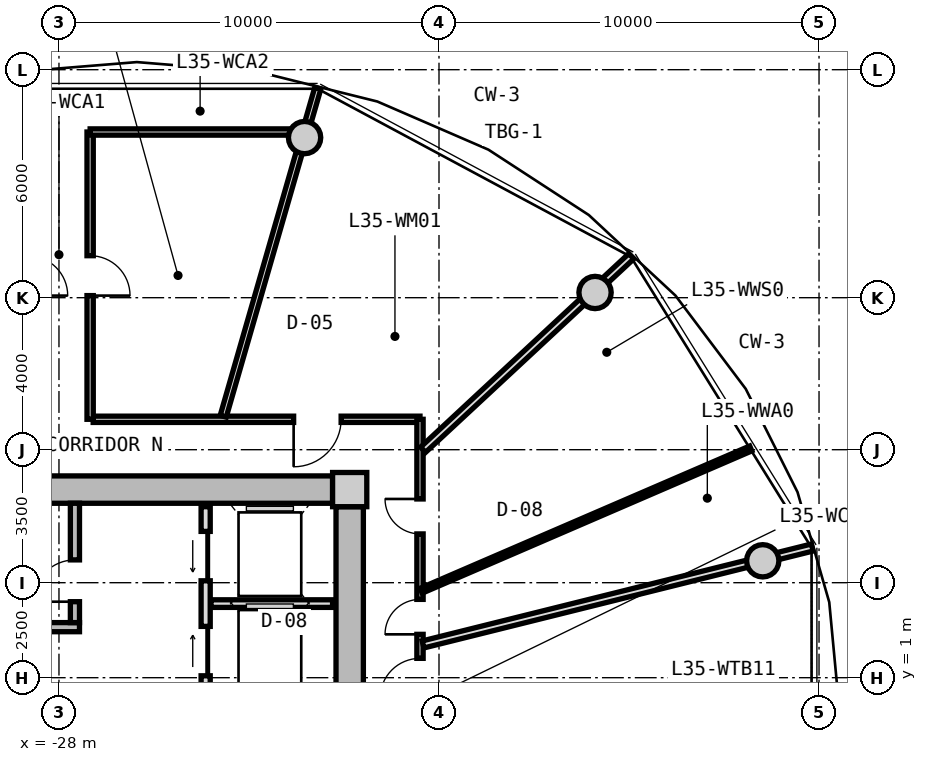
"""IFC4 building model, lengths in metres.
Left out: names, types, materials, properties, quantities, classifications, styles, units other than length and angle.
Written with IfcOpenShell. Run it as: python <this file> out.ifc"""

import sys

from ifc_helpers import new_model, si_unit, direction, frame, frame_2d, origin, origin_2d, place, context, subcontext, project, spatial, rectangle, circle, extrude, source, transform, mapped, element, fill, save


model = new_model("IFC4")
c1 = context("Model", 3, precision=1e-05, world=origin(), true_north=direction((0.0, 1.0)))
c2 = subcontext(c1, "Body", "Model", "MODEL_VIEW")
j1 = project(units=[si_unit("LENGTHUNIT", "METRE"), si_unit("PLANEANGLEUNIT", "RADIAN")], contexts=[c1])
p1 = place(None, origin())
s1 = spatial("IfcSite", under=j1, at=p1, CompositionType="ELEMENT")
p2 = place(p1, origin())
s2 = spatial("IfcBuilding", under=s1, at=p2, CompositionType="ELEMENT")
p3 = place(p2, frame((0.0, 0.0, 114.55)))
s3 = spatial("IfcBuildingStorey", under=s2, at=p3, CompositionType="ELEMENT", Elevation=114.55)
m1 = source(origin(), c2, "Body", "SweptSolid", [
    extrude(rectangle(XDim=0.9, YDim=0.9, at=origin_2d()), origin(), (0.0, 0.0, 1.0), 3.05),
])
p4 = place(p3, frame((-20.35, 5.95, 0.0), z_axis=(0.0, 0.0, 1.0), x_axis=(1.0, 0.0, 0.0)))
e1 = element("IfcColumn", 1, at=p4, inside=s3, PredefinedType="COLUMN", context=c2, shape_type="MappedRepresentation", body=[
    mapped(m1, transform((0.0, 0.0, 0.0), x_axis=(1.0, 0.0, 0.0), y_axis=(0.0, 1.0, 0.0), z_axis=(0.0, 0.0, 1.0), scale=1.0)),
])
m2 = source(origin(), c2, "Body", "SweptSolid", [
    extrude(rectangle(XDim=14.4, YDim=0.72, at=frame_2d((7.2, 0.0))), origin(), (0.0, 0.0, 1.0), 2.79),
])
p5 = place(p3, frame((-35.2, 5.95, 0.0), z_axis=(0.0, 0.0, 1.0), x_axis=(1.0, 0.0, 0.0)))
e2 = element("IfcWall", 2, at=p5, inside=s3, PredefinedType="SHEAR", context=c2, shape_type="MappedRepresentation", body=[
    mapped(m2, transform((0.0, 0.0, 0.0), x_axis=(1.0, 0.0, 0.0), y_axis=(0.0, 1.0, 0.0), z_axis=(0.0, 0.0, 1.0), scale=1.0)),
])
m3 = source(origin(), c2, "Body", "SweptSolid", [
    extrude(rectangle(XDim=11.0, YDim=0.72, at=frame_2d((5.5, 0.0))), origin(), (0.0, 0.0, 1.0), 2.79),
])
p6 = place(p3, frame((-20.35, 5.5, 0.0), z_axis=(0.0, 0.0, 1.0), x_axis=(0.0, -1.0, 0.0)))
e3 = element("IfcWall", 3, at=p6, inside=s3, PredefinedType="SHEAR", context=c2, shape_type="MappedRepresentation", body=[
    mapped(m3, transform((0.0, 0.0, 0.0), x_axis=(1.0, 0.0, 0.0), y_axis=(0.0, 1.0, 0.0), z_axis=(0.0, 0.0, 1.0), scale=1.0)),
])
p7 = place(p6, frame((5.65, 0.0, 0.0)))
e4 = element("IfcOpeningElement", 4, at=p7, cuts=e3, PredefinedType="OPENING", context=c2, shape_type="SweptSolid", body=[
    extrude(rectangle(XDim=1.2, YDim=2.15, at=frame_2d((0.6, 1.075))), frame((0.0, 0.37, 0.0), z_axis=(0.0, -1.0, 0.0), x_axis=(1.0, 0.0, 0.0)), (0.0, 0.0, 1.0), 0.74),
])
p8 = place(p6, frame((9.3, 0.0, 0.0)))
e5 = element("IfcOpeningElement", 5, at=p8, cuts=e3, PredefinedType="OPENING", context=c2, shape_type="SweptSolid", body=[
    extrude(rectangle(XDim=1.0, YDim=2.1, at=frame_2d((0.5, 1.05))), frame((0.0, 0.37, 0.0), z_axis=(0.0, -1.0, 0.0), x_axis=(1.0, 0.0, 0.0)), (0.0, 0.0, 1.0), 0.74),
])
m4 = source(origin(), c2, "Body", "SweptSolid", [
    extrude(circle(Radius=0.425, at=origin_2d()), origin(), (0.0, 0.0, 1.0), 3.05),
])
for number, where, z_axis, x_axis in (
    (6, (-9.481, 4.076, 0.0), (0.0, 0.0, 1.0), (1.0, 0.0, 0.0)),
    (7, (-13.894, 11.137, 0.0), (0.0, 0.0, 1.0), (1.0, 0.0, 0.0)),
    (8, (-21.537, 15.213, 0.0), (0.0, 0.0, 1.0), (1.0, 0.0, 0.0)),
):
    element("IfcColumn", number, at=place(p3, frame(where, z_axis=z_axis, x_axis=x_axis)), inside=s3, PredefinedType="COLUMN", context=c2, shape_type="MappedRepresentation", body=[
        mapped(m4, transform((0.0, 0.0, 0.0), x_axis=(1.0, 0.0, 0.0), y_axis=(0.0, 1.0, 0.0), z_axis=(0.0, 0.0, 1.0), scale=1.0)),
    ])
m5 = source(origin(), c2, "Body", "SweptSolid", [
    extrude(rectangle(XDim=7.83, YDim=0.24, at=frame_2d((3.915, 0.0))), origin(), (0.0, 0.0, 1.0), 2.79),
])
p9 = place(p3, frame((-35.29, 2.33, 0.0), z_axis=(0.0, 0.0, 1.0), x_axis=(1.0, 0.0, 0.0)))
e9 = element("IfcWall", 9, at=p9, inside=s3, PredefinedType="PARTITIONING", context=c2, shape_type="MappedRepresentation", body=[
    mapped(m5, transform((0.0, 0.0, 0.0), x_axis=(1.0, 0.0, 0.0), y_axis=(0.0, 1.0, 0.0), z_axis=(0.0, 0.0, 1.0), scale=1.0)),
])
m6 = source(origin(), c2, "Body", "SweptSolid", [
    extrude(rectangle(XDim=3.14, YDim=0.24, at=frame_2d((1.57, 0.0))), origin(), (0.0, 0.0, 1.0), 2.79),
])
p10 = place(p3, frame((-27.58, 2.45, 0.0), z_axis=(0.0, 0.0, 1.0), x_axis=(0.0, 1.0, 0.0)))
e10 = element("IfcWall", 10, at=p10, inside=s3, PredefinedType="PARTITIONING", context=c2, shape_type="MappedRepresentation", body=[
    mapped(m6, transform((0.0, 0.0, 0.0), x_axis=(1.0, 0.0, 0.0), y_axis=(0.0, 1.0, 0.0), z_axis=(0.0, 0.0, 1.0), scale=1.0)),
])
p11 = place(p10, frame((0.55, 0.0, 0.0)))
e11 = element("IfcOpeningElement", 11, at=p11, cuts=e10, PredefinedType="OPENING", context=c2, shape_type="SweptSolid", body=[
    extrude(rectangle(XDim=1.1, YDim=2.15, at=frame_2d((0.55, 1.075))), frame((0.0, 0.13, 0.0), z_axis=(0.0, -1.0, 0.0), x_axis=(1.0, 0.0, 0.0)), (0.0, 0.0, 1.0), 0.26),
])
m7 = source(origin(), c2, "Body", "SweptSolid", [
    extrude(rectangle(XDim=5.0, YDim=0.24, at=frame_2d((2.5, 0.0))), origin(), (0.0, 0.0, 1.0), 2.775),
])
p12 = place(p3, frame((-24.14, 0.5, 0.0), z_axis=(0.0, 0.0, 1.0), x_axis=(0.0, 1.0, 0.0)))
e12 = element("IfcWall", 12, at=p12, inside=s3, PredefinedType="PARTITIONING", context=c2, shape_type="MappedRepresentation", body=[
    mapped(m7, transform((0.0, 0.0, 0.0), x_axis=(1.0, 0.0, 0.0), y_axis=(0.0, 1.0, 0.0), z_axis=(0.0, 0.0, 1.0), scale=1.0)),
])
p13 = place(p12, frame((3.05, 0.0, 0.0)))
e13 = element("IfcOpeningElement", 13, at=p13, cuts=e12, PredefinedType="OPENING", context=c2, shape_type="SweptSolid", body=[
    extrude(rectangle(XDim=1.3, YDim=2.2, at=frame_2d((0.65, 1.1))), frame((0.0, 0.13, 0.0), z_axis=(0.0, -1.0, 0.0), x_axis=(1.0, 0.0, 0.0)), (0.0, 0.0, 1.0), 0.26),
])
p14 = place(p12, frame((0.55, 0.0, 0.0)))
e14 = element("IfcOpeningElement", 14, at=p14, cuts=e12, PredefinedType="OPENING", context=c2, shape_type="SweptSolid", body=[
    extrude(rectangle(XDim=1.3, YDim=2.2, at=frame_2d((0.65, 1.1))), frame((0.0, 0.13, 0.0), z_axis=(0.0, -1.0, 0.0), x_axis=(1.0, 0.0, 0.0)), (0.0, 0.0, 1.0), 0.26),
])
m8 = source(origin(), c2, "Body", "SweptSolid", [
    extrude(rectangle(XDim=3.2, YDim=0.2, at=frame_2d((1.6, 0.0))), origin(), (0.0, 0.0, 1.0), 2.775),
])
p15 = place(p3, frame((-24.0, 2.95, 0.0), z_axis=(0.0, 0.0, 1.0), x_axis=(1.0, 0.0, 0.0)))
e15 = element("IfcWall", 15, at=p15, inside=s3, PredefinedType="PARTITIONING", context=c2, shape_type="MappedRepresentation", body=[
    mapped(m8, transform((0.0, 0.0, 0.0), x_axis=(1.0, 0.0, 0.0), y_axis=(0.0, 1.0, 0.0), z_axis=(0.0, 0.0, 1.0), scale=1.0)),
])
m9 = source(origin(), c2, "Body", "SweptSolid", [
    extrude(rectangle(XDim=8.6, YDim=0.165, at=frame_2d((4.3, 0.0))), origin(), (0.0, 0.0, 1.0), 2.775),
])
p16 = place(p3, frame((-27.1, 7.8, 0.0), z_axis=(0.0, 0.0, 1.0), x_axis=(1.0, 0.0, 0.0)))
e16 = element("IfcWall", 16, at=p16, inside=s3, PredefinedType="PARTITIONING", context=c2, shape_type="MappedRepresentation", body=[
    mapped(m9, transform((0.0, 0.0, 0.0), x_axis=(1.0, 0.0, 0.0), y_axis=(0.0, 1.0, 0.0), z_axis=(0.0, 0.0, 1.0), scale=1.0)),
])
p17 = place(p16, frame((5.275, 0.0, 0.0)))
e17 = element("IfcOpeningElement", 17, at=p17, cuts=e16, PredefinedType="OPENING", context=c2, shape_type="SweptSolid", body=[
    extrude(rectangle(XDim=1.25, YDim=2.2, at=frame_2d((0.625, 1.1))), frame((0.0, 0.093, 0.0), z_axis=(0.0, -1.0, 0.0), x_axis=(1.0, 0.0, 0.0)), (0.0, 0.0, 1.0), 0.185),
])
m10 = source(origin(), c2, "Body", "SweptSolid", [
    extrude(rectangle(XDim=15.6, YDim=0.165, at=frame_2d((7.8, 0.0))), origin(), (0.0, 0.0, 1.0), 2.775),
])
p18 = place(p3, frame((-18.5, 7.8, 0.0), z_axis=(0.0, 0.0, 1.0), x_axis=(0.0, -1.0, 0.0)))
e18 = element("IfcWall", 18, at=p18, inside=s3, PredefinedType="PARTITIONING", context=c2, shape_type="MappedRepresentation", body=[
    mapped(m10, transform((0.0, 0.0, 0.0), x_axis=(1.0, 0.0, 0.0), y_axis=(0.0, 1.0, 0.0), z_axis=(0.0, 0.0, 1.0), scale=1.0)),
])
p19 = place(p18, frame((12.002, 0.0, 0.0)))
e19 = element("IfcOpeningElement", 19, at=p19, cuts=e18, PredefinedType="OPENING", context=c2, shape_type="SweptSolid", body=[
    extrude(rectangle(XDim=1.05, YDim=2.15, at=frame_2d((0.525, 1.075))), frame((0.0, 0.093, 0.0), z_axis=(0.0, -1.0, 0.0), x_axis=(1.0, 0.0, 0.0)), (0.0, 0.0, 1.0), 0.185),
])
p20 = place(p18, frame((10.211, 0.0, 0.0)))
e20 = element("IfcOpeningElement", 20, at=p20, cuts=e18, PredefinedType="OPENING", context=c2, shape_type="SweptSolid", body=[
    extrude(rectangle(XDim=1.05, YDim=2.15, at=frame_2d((0.525, 1.075))), frame((0.0, 0.093, 0.0), z_axis=(0.0, -1.0, 0.0), x_axis=(1.0, 0.0, 0.0)), (0.0, 0.0, 1.0), 0.185),
])
p21 = place(p18, frame((8.212, 0.0, 0.0)))
e21 = element("IfcOpeningElement", 21, at=p21, cuts=e18, PredefinedType="OPENING", context=c2, shape_type="SweptSolid", body=[
    extrude(rectangle(XDim=1.05, YDim=2.15, at=frame_2d((0.525, 1.075))), frame((0.0, 0.093, 0.0), z_axis=(0.0, -1.0, 0.0), x_axis=(1.0, 0.0, 0.0)), (0.0, 0.0, 1.0), 0.185),
])
p22 = place(p18, frame((6.291, 0.0, 0.0)))
e22 = element("IfcOpeningElement", 22, at=p22, cuts=e18, PredefinedType="OPENING", context=c2, shape_type="SweptSolid", body=[
    extrude(rectangle(XDim=1.05, YDim=2.15, at=frame_2d((0.525, 1.075))), frame((0.0, 0.093, 0.0), z_axis=(0.0, -1.0, 0.0), x_axis=(1.0, 0.0, 0.0)), (0.0, 0.0, 1.0), 0.185),
])
p23 = place(p18, frame((4.739, 0.0, 0.0)))
e23 = element("IfcOpeningElement", 23, at=p23, cuts=e18, PredefinedType="OPENING", context=c2, shape_type="SweptSolid", body=[
    extrude(rectangle(XDim=0.92, YDim=2.1, at=frame_2d((0.46, 1.05))), frame((0.0, 0.093, 0.0), z_axis=(0.0, -1.0, 0.0), x_axis=(1.0, 0.0, 0.0)), (0.0, 0.0, 1.0), 0.185),
])
p24 = place(p18, frame((2.096, 0.0, 0.0)))
e24 = element("IfcOpeningElement", 24, at=p24, cuts=e18, PredefinedType="OPENING", context=c2, shape_type="SweptSolid", body=[
    extrude(rectangle(XDim=0.92, YDim=2.1, at=frame_2d((0.46, 1.05))), frame((0.0, 0.093, 0.0), z_axis=(0.0, -1.0, 0.0), x_axis=(1.0, 0.0, 0.0)), (0.0, 0.0, 1.0), 0.185),
])
m11 = source(origin(), c2, "Body", "SweptSolid", [
    extrude(rectangle(XDim=8.989, YDim=0.165, at=frame_2d((4.495, 0.0))), origin(), (0.0, 0.0, 1.0), 2.275),
])
p25 = place(p3, frame((-23.678, 7.88, 0.0), z_axis=(0.0, 0.0, 1.0), x_axis=(0.27702323008, 0.960863221274, 0.0)))
e25 = element("IfcWall", 25, at=p25, inside=s3, PredefinedType="PARTITIONING", context=c2, shape_type="MappedRepresentation", body=[
    mapped(m11, transform((0.0, 0.0, 0.0), x_axis=(1.0, 0.0, 0.0), y_axis=(0.0, 1.0, 0.0), z_axis=(0.0, 0.0, 1.0), scale=1.0)),
])
m12 = source(origin(), c2, "Body", "SweptSolid", [
    extrude(rectangle(XDim=7.56, YDim=0.165, at=frame_2d((3.78, 0.0))), origin(), (0.0, 0.0, 1.0), 2.775),
])
p26 = place(p3, frame((-27.18, 7.8, 0.0), z_axis=(0.0, 0.0, 1.0), x_axis=(0.0, 1.0, 0.0)))
e26 = element("IfcWall", 26, at=p26, inside=s3, PredefinedType="PARTITIONING", context=c2, shape_type="MappedRepresentation", body=[
    mapped(m12, transform((0.0, 0.0, 0.0), x_axis=(1.0, 0.0, 0.0), y_axis=(0.0, 1.0, 0.0), z_axis=(0.0, 0.0, 1.0), scale=1.0)),
])
p27 = place(p26, frame((3.255, 0.0, 0.0)))
e27 = element("IfcOpeningElement", 27, at=p27, cuts=e26, PredefinedType="OPENING", context=c2, shape_type="SweptSolid", body=[
    extrude(rectangle(XDim=1.05, YDim=2.15, at=frame_2d((0.525, 1.075))), frame((0.0, 0.093, 0.0), z_axis=(0.0, -1.0, 0.0), x_axis=(1.0, 0.0, 0.0)), (0.0, 0.0, 1.0), 0.185),
])
m13 = source(origin(), c2, "Body", "SweptSolid", [
    extrude(rectangle(XDim=5.814, YDim=0.165, at=frame_2d((2.907, 0.0))), origin(), (0.0, 0.0, 1.0), 2.275),
])
p28 = place(p3, frame((-27.18, 15.36, 0.0), z_axis=(0.0, 0.0, 1.0), x_axis=(1.0, 0.0, 0.0)))
e28 = element("IfcWall", 28, at=p28, inside=s3, PredefinedType="PARTITIONING", context=c2, shape_type="MappedRepresentation", body=[
    mapped(m13, transform((0.0, 0.0, 0.0), x_axis=(1.0, 0.0, 0.0), y_axis=(0.0, 1.0, 0.0), z_axis=(0.0, 0.0, 1.0), scale=1.0)),
])
m14 = source(origin(), c2, "Body", "SweptSolid", [
    extrude(rectangle(XDim=10.556, YDim=0.19, at=frame_2d((5.278, 0.0))), origin(), (0.0, 0.0, 1.0), 2.275),
])
p29 = place(p3, frame((-18.42, 1.875, 0.0), z_axis=(0.0, 0.0, 1.0), x_axis=(0.970363857851, 0.241648470667, 0.0)))
e29 = element("IfcWall", 29, at=p29, inside=s3, PredefinedType="PARTITIONING", context=c2, shape_type="MappedRepresentation", body=[
    mapped(m14, transform((0.0, 0.0, 0.0), x_axis=(1.0, 0.0, 0.0), y_axis=(0.0, 1.0, 0.0), z_axis=(0.0, 0.0, 1.0), scale=1.0)),
])
m15 = source(origin(), c2, "Body", "SweptSolid", [
    extrude(rectangle(XDim=7.482, YDim=0.19, at=frame_2d((3.741, 0.0))), origin(), (0.0, 0.0, 1.0), 2.275),
])
p30 = place(p3, frame((-18.42, 6.998, 0.0), z_axis=(0.0, 0.0, 1.0), x_axis=(0.732508698043, 0.680757671489, 0.0)))
e30 = element("IfcWall", 30, at=p30, inside=s3, PredefinedType="PARTITIONING", context=c2, shape_type="MappedRepresentation", body=[
    mapped(m15, transform((0.0, 0.0, 0.0), x_axis=(1.0, 0.0, 0.0), y_axis=(0.0, 1.0, 0.0), z_axis=(0.0, 0.0, 1.0), scale=1.0)),
])
m16 = source(origin(), c2, "Body", "SweptSolid", [
    extrude(rectangle(XDim=9.447, YDim=0.14, at=frame_2d((4.724, 0.0))), origin(), (0.0, 0.0, 1.0), 2.775),
])
p31 = place(p3, frame((-18.47, 3.289, 0.0), z_axis=(0.0, 0.0, 1.0), x_axis=(0.918162367414, 0.396204324894, 0.0)))
e31 = element("IfcWall", 31, at=p31, inside=s3, PredefinedType="PARTITIONING", context=c2, shape_type="MappedRepresentation", body=[
    mapped(m16, transform((0.0, 0.0, 0.0), x_axis=(1.0, 0.0, 0.0), y_axis=(0.0, 1.0, 0.0), z_axis=(0.0, 0.0, 1.0), scale=1.0)),
])
m17 = source(origin(), c2, "Body", "SweptSolid", [
    extrude(rectangle(XDim=1.1, YDim=2.15, at=frame_2d((0.55, 1.075))), frame((0.0, 0.025, 0.0), z_axis=(0.0, -1.0, 0.0), x_axis=(1.0, 0.0, 0.0)), (0.0, 0.0, 1.0), 0.05),
])
p32 = place(p11, origin())
e32 = element("IfcDoor", 32, at=p32, inside=s3, OperationType="SINGLE_SWING_LEFT", PredefinedType="DOOR", context=c2, shape_type="MappedRepresentation", body=[
    mapped(m17, transform((0.0, 0.0, 0.0), x_axis=(1.0, 0.0, 0.0), y_axis=(0.0, 1.0, 0.0), z_axis=(0.0, 0.0, 1.0), scale=1.0)),
])
fill(e11, e32)
m18 = source(origin(), c2, "Body", "SweptSolid", [
    extrude(rectangle(XDim=1.3, YDim=2.2, at=frame_2d((0.65, 1.1))), frame((0.0, 0.025, 0.0), z_axis=(0.0, -1.0, 0.0), x_axis=(1.0, 0.0, 0.0)), (0.0, 0.0, 1.0), 0.05),
])
p33 = place(p13, origin())
e33 = element("IfcDoor", 33, at=p33, inside=s3, OperationType="SLIDING_TO_LEFT", PredefinedType="DOOR", context=c2, shape_type="MappedRepresentation", body=[
    mapped(m18, transform((0.0, 0.0, 0.0), x_axis=(1.0, 0.0, 0.0), y_axis=(0.0, 1.0, 0.0), z_axis=(0.0, 0.0, 1.0), scale=1.0)),
])
fill(e13, e33)
p34 = place(p14, origin())
e34 = element("IfcDoor", 34, at=p34, inside=s3, OperationType="SLIDING_TO_RIGHT", PredefinedType="DOOR", context=c2, shape_type="MappedRepresentation", body=[
    mapped(m18, transform((0.0, 0.0, 0.0), x_axis=(1.0, 0.0, 0.0), y_axis=(0.0, 1.0, 0.0), z_axis=(0.0, 0.0, 1.0), scale=1.0)),
])
fill(e14, e34)
m19 = source(origin(), c2, "Body", "SweptSolid", [
    extrude(rectangle(XDim=1.05, YDim=2.15, at=frame_2d((0.525, 1.075))), frame((0.0, 0.025, 0.0), z_axis=(0.0, -1.0, 0.0), x_axis=(1.0, 0.0, 0.0)), (0.0, 0.0, 1.0), 0.05),
])
p35 = place(p27, frame((1.05, 0.0, 0.0), z_axis=(0.0, 0.0, 1.0), x_axis=(-1.0, 0.0, 0.0)))
e35 = element("IfcDoor", 35, at=p35, inside=s3, OperationType="SINGLE_SWING_RIGHT", PredefinedType="DOOR", context=c2, shape_type="MappedRepresentation", body=[
    mapped(m19, transform((0.0, 0.0, 0.0), x_axis=(1.0, 0.0, 0.0), y_axis=(0.0, 1.0, 0.0), z_axis=(0.0, 0.0, 1.0), scale=1.0)),
])
fill(e27, e35)
p36 = place(p22, frame((1.05, 0.0, 0.0), z_axis=(0.0, 0.0, 1.0), x_axis=(-1.0, 0.0, 0.0)))
e36 = element("IfcDoor", 36, at=p36, inside=s3, OperationType="SINGLE_SWING_LEFT", PredefinedType="DOOR", context=c2, shape_type="MappedRepresentation", body=[
    mapped(m19, transform((0.0, 0.0, 0.0), x_axis=(1.0, 0.0, 0.0), y_axis=(0.0, 1.0, 0.0), z_axis=(0.0, 0.0, 1.0), scale=1.0)),
])
fill(e22, e36)
m20 = source(origin(), c2, "Body", "SweptSolid", [
    extrude(rectangle(XDim=0.92, YDim=2.1, at=frame_2d((0.46, 1.05))), frame((0.0, 0.025, 0.0), z_axis=(0.0, -1.0, 0.0), x_axis=(1.0, 0.0, 0.0)), (0.0, 0.0, 1.0), 0.05),
])
p37 = place(p23, frame((0.92, 0.0, 0.0), z_axis=(0.0, 0.0, 1.0), x_axis=(-1.0, 0.0, 0.0)))
e37 = element("IfcDoor", 37, at=p37, inside=s3, OperationType="SINGLE_SWING_LEFT", PredefinedType="DOOR", context=c2, shape_type="MappedRepresentation", body=[
    mapped(m20, transform((0.0, 0.0, 0.0), x_axis=(1.0, 0.0, 0.0), y_axis=(0.0, 1.0, 0.0), z_axis=(0.0, 0.0, 1.0), scale=1.0)),
])
fill(e23, e37)
p38 = place(p24, frame((0.92, 0.0, 0.0), z_axis=(0.0, 0.0, 1.0), x_axis=(-1.0, 0.0, 0.0)))
e38 = element("IfcDoor", 38, at=p38, inside=s3, OperationType="SINGLE_SWING_RIGHT", PredefinedType="DOOR", context=c2, shape_type="MappedRepresentation", body=[
    mapped(m20, transform((0.0, 0.0, 0.0), x_axis=(1.0, 0.0, 0.0), y_axis=(0.0, 1.0, 0.0), z_axis=(0.0, 0.0, 1.0), scale=1.0)),
])
fill(e24, e38)
m21 = source(origin(), c2, "Body", "SweptSolid", [
    extrude(rectangle(XDim=1.25, YDim=2.2, at=frame_2d((0.625, 1.1))), frame((0.0, 0.025, 0.0), z_axis=(0.0, -1.0, 0.0), x_axis=(1.0, 0.0, 0.0)), (0.0, 0.0, 1.0), 0.05),
])
p39 = place(p17, frame((1.25, 0.0, 0.0), z_axis=(0.0, 0.0, 1.0), x_axis=(-1.0, 0.0, 0.0)))
e39 = element("IfcDoor", 39, at=p39, inside=s3, OperationType="SINGLE_SWING_RIGHT", PredefinedType="DOOR", context=c2, shape_type="MappedRepresentation", body=[
    mapped(m21, transform((0.0, 0.0, 0.0), x_axis=(1.0, 0.0, 0.0), y_axis=(0.0, 1.0, 0.0), z_axis=(0.0, 0.0, 1.0), scale=1.0)),
])
fill(e17, e39)
save(model, sys.argv[1])
